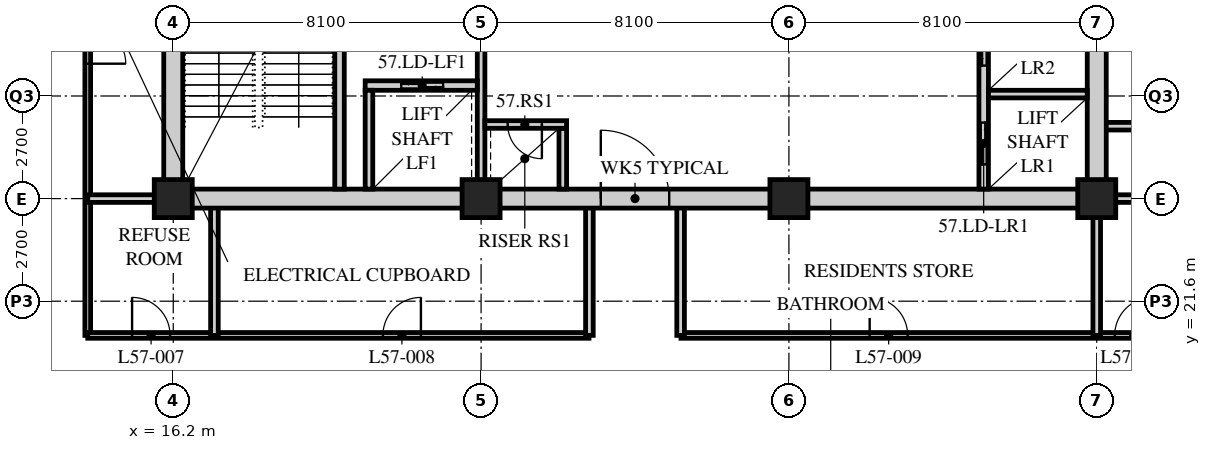
"""IFC4 building model, lengths in metres.
Left out: names, types, materials, properties, quantities, classifications, styles, units other than length and angle.
Written with IfcOpenShell. Run it as: python <this file> out.ifc"""

import sys

from ifc_helpers import new_model, si_unit, direction, frame, frame_2d, origin, origin_2d, place, context, subcontext, project, spatial, rectangle, hollow_rectangle, extrude, element, fill, save


model = new_model("IFC4")
c1 = context("Model", 3, precision=1e-05, world=origin(), true_north=direction((0.0, 1.0)))
c2 = subcontext(c1, "Body", "Model", "MODEL_VIEW")
j1 = project(units=[si_unit("LENGTHUNIT", "METRE"), si_unit("PLANEANGLEUNIT", "RADIAN")], contexts=[c1])
p1 = place(None, origin())
s1 = spatial("IfcSite", under=j1, at=p1, CompositionType="ELEMENT")
p2 = place(p1, origin())
s2 = spatial("IfcBuilding", under=s1, at=p2, CompositionType="ELEMENT")
p3 = place(p2, frame((0.0, 0.0, 220.8)))
s3 = spatial("IfcBuildingStorey", under=s2, at=p3, CompositionType="ELEMENT", Elevation=220.8)
for number, where, z_axis, x_axis in (
    (1, (16.2, 24.3, 0.0), (0.0, 0.0, 1.0), (1.0, 0.0, 0.0)),
    (2, (24.3, 24.3, 0.0), (0.0, 0.0, 1.0), (1.0, 0.0, 0.0)),
    (3, (32.4, 24.3, 0.0), (0.0, 0.0, 1.0), (1.0, 0.0, 0.0)),
    (4, (40.5, 24.3, 0.0), (0.0, 0.0, 1.0), (1.0, 0.0, 0.0)),
):
    element("IfcColumn", number, at=place(p3, frame(where, z_axis=z_axis, x_axis=x_axis)), inside=s3, PredefinedType="COLUMN", context=c2, shape_type="SweptSolid", body=[
        extrude(hollow_rectangle(XDim=1.0, YDim=1.0, WallThickness=0.1, at=origin_2d()), origin(), (0.0, 0.0, 1.0), 3.6),
    ])
p4 = place(p3, frame((13.95, 40.5, 0.0), z_axis=(0.0, 0.0, 1.0), x_axis=(0.0, -1.0, 0.0)))
e5 = element("IfcWall", 5, at=p4, inside=s3, PredefinedType="PARTITIONING", context=c2, shape_type="SweptSolid", body=[
    extrude(rectangle(XDim=19.8, YDim=0.15, at=frame_2d((9.9, 0.0))), origin(), (0.0, 0.0, 1.0), 3.39),
])
p5 = place(p4, frame((11.65, 0.0, 0.0)))
e6 = element("IfcOpeningElement", 6, at=p5, cuts=e5, PredefinedType="OPENING", context=c2, shape_type="SweptSolid", body=[
    extrude(rectangle(XDim=1.0, YDim=2.1, at=frame_2d((0.5, 1.05))), frame((0.0, 0.085, 0.0), z_axis=(0.0, -1.0, 0.0), x_axis=(1.0, 0.0, 0.0)), (0.0, 0.0, 1.0), 0.17),
])
p6 = place(p4, frame((3.55, 0.0, 0.0)))
e7 = element("IfcOpeningElement", 7, at=p6, cuts=e5, PredefinedType="OPENING", context=c2, shape_type="SweptSolid", body=[
    extrude(rectangle(XDim=1.0, YDim=2.1, at=frame_2d((0.5, 1.05))), frame((0.0, 0.085, 0.0), z_axis=(0.0, -1.0, 0.0), x_axis=(1.0, 0.0, 0.0)), (0.0, 0.0, 1.0), 0.17),
])
p7 = place(p3, frame((13.95, 20.7, 0.0), z_axis=(0.0, 0.0, 1.0), x_axis=(1.0, 0.0, 0.0)))
e8 = element("IfcWall", 8, at=p7, inside=s3, PredefinedType="PARTITIONING", context=c2, shape_type="SweptSolid", body=[
    extrude(rectangle(XDim=13.19, YDim=0.15, at=frame_2d((6.595, 0.0))), origin(), (0.0, 0.0, 1.0), 3.39),
])
p8 = place(p7, frame((1.167, 0.0, 0.0)))
e9 = element("IfcOpeningElement", 9, at=p8, cuts=e8, PredefinedType="OPENING", context=c2, shape_type="SweptSolid", body=[
    extrude(rectangle(XDim=1.0, YDim=2.1, at=frame_2d((0.5, 1.05))), frame((0.0, 0.085, 0.0), z_axis=(0.0, -1.0, 0.0), x_axis=(1.0, 0.0, 0.0)), (0.0, 0.0, 1.0), 0.17),
])
p9 = place(p7, frame((7.767, 0.0, 0.0)))
e10 = element("IfcOpeningElement", 10, at=p9, cuts=e8, PredefinedType="OPENING", context=c2, shape_type="SweptSolid", body=[
    extrude(rectangle(XDim=1.0, YDim=2.1, at=frame_2d((0.5, 1.05))), frame((0.0, 0.085, 0.0), z_axis=(0.0, -1.0, 0.0), x_axis=(1.0, 0.0, 0.0)), (0.0, 0.0, 1.0), 0.17),
])
p10 = place(p3, frame((29.56, 20.7, 0.0), z_axis=(0.0, 0.0, 1.0), x_axis=(1.0, 0.0, 0.0)))
e11 = element("IfcWall", 11, at=p10, inside=s3, PredefinedType="PARTITIONING", context=c2, shape_type="SweptSolid", body=[
    extrude(rectangle(XDim=17.24, YDim=0.15, at=frame_2d((8.62, 0.0))), origin(), (0.0, 0.0, 1.0), 3.39),
])
p11 = place(p10, frame((4.965, 0.0, 0.0)))
e12 = element("IfcOpeningElement", 12, at=p11, cuts=e11, PredefinedType="OPENING", context=c2, shape_type="SweptSolid", body=[
    extrude(rectangle(XDim=1.0, YDim=2.1, at=frame_2d((0.5, 1.05))), frame((0.0, 0.085, 0.0), z_axis=(0.0, -1.0, 0.0), x_axis=(1.0, 0.0, 0.0)), (0.0, 0.0, 1.0), 0.17),
])
p12 = place(p10, frame((11.412, 0.0, 0.0)))
e13 = element("IfcOpeningElement", 13, at=p12, cuts=e11, PredefinedType="OPENING", context=c2, shape_type="SweptSolid", body=[
    extrude(rectangle(XDim=1.0, YDim=2.1, at=frame_2d((0.5, 1.05))), frame((0.0, 0.085, 0.0), z_axis=(0.0, -1.0, 0.0), x_axis=(1.0, 0.0, 0.0)), (0.0, 0.0, 1.0), 0.17),
])
p13 = place(p10, frame((14.562, 0.0, 0.0)))
e14 = element("IfcOpeningElement", 14, at=p13, cuts=e11, PredefinedType="OPENING", context=c2, shape_type="SweptSolid", body=[
    extrude(rectangle(XDim=1.0, YDim=2.1, at=frame_2d((0.5, 1.05))), frame((0.0, 0.085, 0.0), z_axis=(0.0, -1.0, 0.0), x_axis=(1.0, 0.0, 0.0)), (0.0, 0.0, 1.0), 0.17),
])
p14 = place(p3, frame((46.8, 26.205, 0.0), z_axis=(0.0, 0.0, 1.0), x_axis=(-1.0, 0.0, 0.0)))
e15 = element("IfcWall", 15, at=p14, inside=s3, PredefinedType="SOLIDWALL", context=c2, shape_type="SweptSolid", body=[
    extrude(rectangle(XDim=6.3, YDim=0.2, at=frame_2d((3.15, 0.0))), origin(), (0.0, 0.0, 1.0), 3.39),
])
p15 = place(p3, frame((17.283, 20.7, 0.0), z_axis=(0.0, 0.0, 1.0), x_axis=(0.0, 1.0, 0.0)))
e16 = element("IfcWall", 16, at=p15, inside=s3, PredefinedType="SOLIDWALL", context=c2, shape_type="SweptSolid", body=[
    extrude(rectangle(XDim=3.6, YDim=0.2, at=frame_2d((1.8, 0.0))), origin(), (0.0, 0.0, 1.0), 3.39),
])
p16 = place(p3, frame((40.5, 20.7, 0.0), z_axis=(0.0, 0.0, 1.0), x_axis=(0.0, 1.0, 0.0)))
e17 = element("IfcWall", 17, at=p16, inside=s3, PredefinedType="SOLIDWALL", context=c2, shape_type="SweptSolid", body=[
    extrude(rectangle(XDim=3.6, YDim=0.2, at=frame_2d((1.8, 0.0))), origin(), (0.0, 0.0, 1.0), 2.628),
])
for number, where, z_axis, x_axis in (
    (18, (27.15, 20.7, 0.0), (0.0, 0.0, 1.0), (0.0, 1.0, 0.0)),
    (19, (29.55, 20.7, 0.0), (0.0, 0.0, 1.0), (0.0, 1.0, 0.0)),
):
    element("IfcWall", number, at=place(p3, frame(where, z_axis=z_axis, x_axis=x_axis)), inside=s3, PredefinedType="SOLIDWALL", context=c2, shape_type="SweptSolid", body=[
        extrude(rectangle(XDim=3.6, YDim=0.2, at=frame_2d((1.8, 0.0))), origin(), (0.0, 0.0, 1.0), 3.39),
    ])
p17 = place(p3, frame((13.95, 24.3, 0.0), z_axis=(0.0, 0.0, 1.0), x_axis=(1.0, 0.0, 0.0)))
e20 = element("IfcWall", 20, at=p17, inside=s3, PredefinedType="SOLIDWALL", context=c2, shape_type="SweptSolid", body=[
    extrude(rectangle(XDim=2.25, YDim=0.2, at=frame_2d((1.125, 0.0))), origin(), (0.0, 0.0, 1.0), 3.39),
])
p18 = place(p3, frame((40.5, 24.3, 0.0), z_axis=(0.0, 0.0, 1.0), x_axis=(1.0, 0.0, 0.0)))
e21 = element("IfcWall", 21, at=p18, inside=s3, PredefinedType="SOLIDWALL", context=c2, shape_type="SweptSolid", body=[
    extrude(rectangle(XDim=6.3, YDim=0.2, at=frame_2d((3.15, 0.0))), origin(), (0.0, 0.0, 1.0), 3.39),
])
p19 = place(p3, frame((15.95, 24.3, 0.0), z_axis=(0.0, 0.0, 1.0), x_axis=(1.0, 0.0, 0.0)))
e22 = element("IfcWall", 22, at=p19, inside=s3, PredefinedType="SOLIDWALL", context=c2, shape_type="SweptSolid", body=[
    extrude(rectangle(XDim=24.8, YDim=0.5, at=frame_2d((12.4, 0.0))), origin(), (0.0, 0.0, 1.0), 2.628),
])
p20 = place(p19, frame((11.5, 0.0, 0.0)))
e23 = element("IfcOpeningElement", 23, at=p20, cuts=e22, PredefinedType="OPENING", context=c2, shape_type="SweptSolid", body=[
    extrude(rectangle(XDim=1.8, YDim=2.4, at=frame_2d((0.9, 1.2))), frame((0.0, 0.26, 0.0), z_axis=(0.0, -1.0, 0.0), x_axis=(1.0, 0.0, 0.0)), (0.0, 0.0, 1.0), 0.52),
])
for number, where, z_axis, x_axis in (
    (24, (16.2, 24.55, 0.0), (0.0, 0.0, 1.0), (0.0, 1.0, 0.0)),
    (25, (40.5, 24.55, 0.0), (0.0, 0.0, 1.0), (0.0, 1.0, 0.0)),
):
    element("IfcWall", number, at=place(p3, frame(where, z_axis=z_axis, x_axis=x_axis)), inside=s3, PredefinedType="SOLIDWALL", context=c2, shape_type="SweptSolid", body=[
        extrude(rectangle(XDim=15.7, YDim=0.5, at=frame_2d((7.85, 0.0))), origin(), (0.0, 0.0, 1.0), 2.628),
    ])
p21 = place(p3, frame((24.3, 24.55, 0.0), z_axis=(0.0, 0.0, 1.0), x_axis=(0.0, 1.0, 0.0)))
e26 = element("IfcWall", 26, at=p21, inside=s3, PredefinedType="SOLIDWALL", context=c2, shape_type="SweptSolid", body=[
    extrude(rectangle(XDim=7.75, YDim=0.2, at=frame_2d((3.875, 0.0))), origin(), (0.0, 0.0, 1.0), 2.778),
])
p22 = place(p21, frame((4.6, 0.0, 0.0)))
e27 = element("IfcOpeningElement", 27, at=p22, cuts=e26, PredefinedType="OPENING", context=c2, shape_type="SweptSolid", body=[
    extrude(rectangle(XDim=1.2, YDim=2.1, at=frame_2d((0.6, 1.05))), frame((0.0, 0.11, 0.0), z_axis=(0.0, -1.0, 0.0), x_axis=(1.0, 0.0, 0.0)), (0.0, 0.0, 1.0), 0.22),
])
p23 = place(p3, frame((20.575, 24.55, 0.0), z_axis=(0.0, 0.0, 1.0), x_axis=(0.0, 1.0, 0.0)))
e28 = element("IfcWall", 28, at=p23, inside=s3, PredefinedType="SOLIDWALL", context=c2, shape_type="SweptSolid", body=[
    extrude(rectangle(XDim=7.75, YDim=0.25, at=frame_2d((3.875, 0.0))), origin(), (0.0, 0.0, 1.0), 3.39),
])
p24 = place(p23, frame((6.2, 0.0, 0.0)))
e29 = element("IfcOpeningElement", 29, at=p24, cuts=e28, PredefinedType="OPENING", context=c2, shape_type="SweptSolid", body=[
    extrude(rectangle(XDim=1.2, YDim=2.1, at=frame_2d((0.6, 1.05))), frame((0.0, 0.135, 0.0), z_axis=(0.0, -1.0, 0.0), x_axis=(1.0, 0.0, 0.0)), (0.0, 0.0, 1.0), 0.27),
])
p25 = place(p3, frame((21.25, 27.275, 0.0), z_axis=(0.0, 0.0, 1.0), x_axis=(1.0, 0.0, 0.0)))
e30 = element("IfcWall", 30, at=p25, inside=s3, PredefinedType="SOLIDWALL", context=c2, shape_type="SweptSolid", body=[
    extrude(rectangle(XDim=2.95, YDim=0.25, at=frame_2d((1.475, 0.0))), origin(), (0.0, 0.0, 1.0), 3.39),
])
p26 = place(p25, frame((0.95, 0.0, 0.0)))
e31 = element("IfcOpeningElement", 31, at=p26, cuts=e30, PredefinedType="OPENING", context=c2, shape_type="SweptSolid", body=[
    extrude(rectangle(XDim=1.1, YDim=2.4, at=frame_2d((0.55, 1.2))), frame((0.0, 0.135, 0.0), z_axis=(0.0, -1.0, 0.0), x_axis=(1.0, 0.0, 0.0)), (0.0, 0.0, 1.0), 0.27),
])
p27 = place(p3, frame((21.35, 24.55, 0.0), z_axis=(0.0, 0.0, 1.0), x_axis=(0.0, 1.0, 0.0)))
e32 = element("IfcWall", 32, at=p27, inside=s3, PredefinedType="SOLIDWALL", context=c2, shape_type="SweptSolid", body=[
    extrude(rectangle(XDim=2.6, YDim=0.2, at=frame_2d((1.3, 0.0))), origin(), (0.0, 0.0, 1.0), 3.39),
])
p28 = place(p3, frame((26.45, 24.55, 0.0), z_axis=(0.0, 0.0, 1.0), x_axis=(0.0, 1.0, 0.0)))
e33 = element("IfcWall", 33, at=p28, inside=s3, PredefinedType="SOLIDWALL", context=c2, shape_type="SweptSolid", body=[
    extrude(rectangle(XDim=1.6, YDim=0.2, at=frame_2d((0.8, 0.0))), origin(), (0.0, 0.0, 1.0), 3.39),
])
p29 = place(p3, frame((24.4, 26.25, 0.0), z_axis=(0.0, 0.0, 1.0), x_axis=(1.0, 0.0, 0.0)))
e34 = element("IfcWall", 34, at=p29, inside=s3, PredefinedType="SOLIDWALL", context=c2, shape_type="SweptSolid", body=[
    extrude(rectangle(XDim=2.15, YDim=0.2, at=frame_2d((1.075, 0.0))), origin(), (0.0, 0.0, 1.0), 3.39),
])
p30 = place(p29, frame((0.6, 0.0, 0.0)))
e35 = element("IfcOpeningElement", 35, at=p30, cuts=e34, PredefinedType="OPENING", context=c2, shape_type="SweptSolid", body=[
    extrude(rectangle(XDim=0.9, YDim=2.1, at=frame_2d((0.45, 1.05))), frame((0.0, 0.11, 0.0), z_axis=(0.0, -1.0, 0.0), x_axis=(1.0, 0.0, 0.0)), (0.0, 0.0, 1.0), 0.22),
])
p31 = place(p3, frame((37.525, 24.55, 0.0), z_axis=(0.0, 0.0, 1.0), x_axis=(0.0, 1.0, 0.0)))
e36 = element("IfcWall", 36, at=p31, inside=s3, PredefinedType="SOLIDWALL", context=c2, shape_type="SweptSolid", body=[
    extrude(rectangle(XDim=7.75, YDim=0.25, at=frame_2d((3.875, 0.0))), origin(), (0.0, 0.0, 1.0), 3.39),
])
p32 = place(p31, frame((0.65, 0.0, 0.0)))
e37 = element("IfcOpeningElement", 37, at=p32, cuts=e36, PredefinedType="OPENING", context=c2, shape_type="SweptSolid", body=[
    extrude(rectangle(XDim=1.1, YDim=2.4, at=frame_2d((0.55, 1.2))), frame((0.0, 0.135, 0.0), z_axis=(0.0, -1.0, 0.0), x_axis=(1.0, 0.0, 0.0)), (0.0, 0.0, 1.0), 0.27),
])
p33 = place(p31, frame((3.25, 0.0, 0.0)))
e38 = element("IfcOpeningElement", 38, at=p33, cuts=e36, PredefinedType="OPENING", context=c2, shape_type="SweptSolid", body=[
    extrude(rectangle(XDim=1.1, YDim=2.4, at=frame_2d((0.55, 1.2))), frame((0.0, 0.135, 0.0), z_axis=(0.0, -1.0, 0.0), x_axis=(1.0, 0.0, 0.0)), (0.0, 0.0, 1.0), 0.27),
])
p34 = place(p31, frame((5.85, 0.0, 0.0)))
e39 = element("IfcOpeningElement", 39, at=p34, cuts=e36, PredefinedType="OPENING", context=c2, shape_type="SweptSolid", body=[
    extrude(rectangle(XDim=1.1, YDim=2.4, at=frame_2d((0.55, 1.2))), frame((0.0, 0.135, 0.0), z_axis=(0.0, -1.0, 0.0), x_axis=(1.0, 0.0, 0.0)), (0.0, 0.0, 1.0), 0.27),
])
p35 = place(p3, frame((37.65, 27.05, 0.0), z_axis=(0.0, 0.0, 1.0), x_axis=(1.0, 0.0, 0.0)))
e40 = element("IfcWall", 40, at=p35, inside=s3, PredefinedType="SOLIDWALL", context=c2, shape_type="SweptSolid", body=[
    extrude(rectangle(XDim=2.6, YDim=0.2, at=frame_2d((1.3, 0.0))), origin(), (0.0, 0.0, 1.0), 3.39),
])
p36 = place(p5, origin())
e41 = element("IfcDoor", 41, at=p36, inside=s3, OperationType="SINGLE_SWING_RIGHT", PredefinedType="DOOR", context=c2, shape_type="SweptSolid", body=[
    extrude(rectangle(XDim=1.0, YDim=2.1, at=frame_2d((0.5, 1.05))), frame((0.0, 0.025, 0.0), z_axis=(0.0, -1.0, 0.0), x_axis=(1.0, 0.0, 0.0)), (0.0, 0.0, 1.0), 0.05),
])
fill(e6, e41)
p37 = place(p8, origin())
e42 = element("IfcDoor", 42, at=p37, inside=s3, OperationType="SINGLE_SWING_LEFT", PredefinedType="DOOR", context=c2, shape_type="SweptSolid", body=[
    extrude(rectangle(XDim=1.0, YDim=2.1, at=frame_2d((0.5, 1.05))), frame((0.0, 0.025, 0.0), z_axis=(0.0, -1.0, 0.0), x_axis=(1.0, 0.0, 0.0)), (0.0, 0.0, 1.0), 0.05),
])
fill(e9, e42)
p38 = place(p9, origin())
e43 = element("IfcDoor", 43, at=p38, inside=s3, OperationType="SINGLE_SWING_RIGHT", PredefinedType="DOOR", context=c2, shape_type="SweptSolid", body=[
    extrude(rectangle(XDim=1.0, YDim=2.1, at=frame_2d((0.5, 1.05))), frame((0.0, 0.025, 0.0), z_axis=(0.0, -1.0, 0.0), x_axis=(1.0, 0.0, 0.0)), (0.0, 0.0, 1.0), 0.05),
])
fill(e10, e43)
p39 = place(p11, origin())
e44 = element("IfcDoor", 44, at=p39, inside=s3, OperationType="SINGLE_SWING_LEFT", PredefinedType="DOOR", context=c2, shape_type="SweptSolid", body=[
    extrude(rectangle(XDim=1.0, YDim=2.1, at=frame_2d((0.5, 1.05))), frame((0.0, 0.025, 0.0), z_axis=(0.0, -1.0, 0.0), x_axis=(1.0, 0.0, 0.0)), (0.0, 0.0, 1.0), 0.05),
])
fill(e12, e44)
p40 = place(p12, origin())
e45 = element("IfcDoor", 45, at=p40, inside=s3, OperationType="SINGLE_SWING_RIGHT", PredefinedType="DOOR", context=c2, shape_type="SweptSolid", body=[
    extrude(rectangle(XDim=1.0, YDim=2.1, at=frame_2d((0.5, 1.05))), frame((0.0, 0.025, 0.0), z_axis=(0.0, -1.0, 0.0), x_axis=(1.0, 0.0, 0.0)), (0.0, 0.0, 1.0), 0.05),
])
fill(e13, e45)
p41 = place(p30, origin())
e46 = element("IfcDoor", 46, at=p41, inside=s3, OperationType="SINGLE_SWING_LEFT", PredefinedType="DOOR", context=c2, shape_type="SweptSolid", body=[
    extrude(rectangle(XDim=0.9, YDim=2.1, at=frame_2d((0.45, 1.05))), frame((0.0, 0.025, 0.0), z_axis=(0.0, -1.0, 0.0), x_axis=(1.0, 0.0, 0.0)), (0.0, 0.0, 1.0), 0.05),
])
fill(e35, e46)
p42 = place(p32, origin())
e47 = element("IfcDoor", 47, at=p42, inside=s3, OperationType="DOUBLE_DOOR_SLIDING", PredefinedType="DOOR", context=c2, shape_type="SweptSolid", body=[
    extrude(rectangle(XDim=1.1, YDim=2.4, at=frame_2d((0.55, 1.2))), frame((0.0, 0.025, 0.0), z_axis=(0.0, -1.0, 0.0), x_axis=(1.0, 0.0, 0.0)), (0.0, 0.0, 1.0), 0.05),
])
fill(e37, e47)
p43 = place(p33, origin())
e48 = element("IfcDoor", 48, at=p43, inside=s3, OperationType="DOUBLE_DOOR_SLIDING", PredefinedType="DOOR", context=c2, shape_type="SweptSolid", body=[
    extrude(rectangle(XDim=1.1, YDim=2.4, at=frame_2d((0.55, 1.2))), frame((0.0, 0.025, 0.0), z_axis=(0.0, -1.0, 0.0), x_axis=(1.0, 0.0, 0.0)), (0.0, 0.0, 1.0), 0.05),
])
fill(e38, e48)
p44 = place(p26, origin())
e49 = element("IfcDoor", 49, at=p44, inside=s3, OperationType="DOUBLE_DOOR_SLIDING", PredefinedType="DOOR", context=c2, shape_type="SweptSolid", body=[
    extrude(rectangle(XDim=1.1, YDim=2.4, at=frame_2d((0.55, 1.2))), frame((0.0, 0.025, 0.0), z_axis=(0.0, -1.0, 0.0), x_axis=(1.0, 0.0, 0.0)), (0.0, 0.0, 1.0), 0.05),
])
fill(e31, e49)
p45 = place(p20, origin())
e50 = element("IfcDoor", 50, at=p45, inside=s3, OperationType="DOUBLE_DOOR_SINGLE_SWING", PredefinedType="DOOR", context=c2, shape_type="SweptSolid", body=[
    extrude(rectangle(XDim=1.8, YDim=2.4, at=frame_2d((0.9, 1.2))), frame((0.0, 0.025, 0.0), z_axis=(0.0, -1.0, 0.0), x_axis=(1.0, 0.0, 0.0)), (0.0, 0.0, 1.0), 0.05),
])
fill(e23, e50)
save(model, sys.argv[1])
